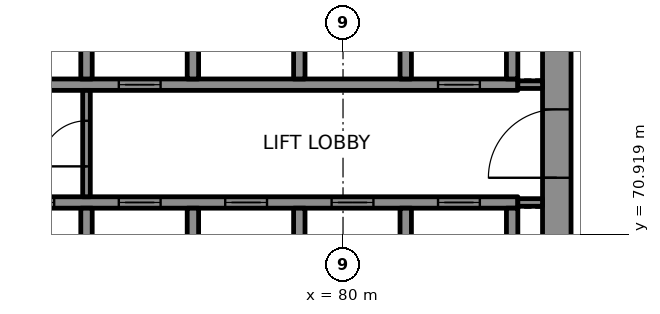
"""IFC4 building model, lengths in metres.
Left out: names, types, materials, properties, quantities, classifications, styles, units other than length and angle.
Written with IfcOpenShell. Run it as: python <this file> out.ifc"""

import sys

from ifc_helpers import new_model, si_unit, direction, frame, frame_2d, origin, place, context, subcontext, project, spatial, rectangle, extrude, element, fill, save


model = new_model("IFC4")
c1 = context("Model", 3, precision=1e-05, world=origin(), true_north=direction((0.0, 1.0)))
c2 = subcontext(c1, "Body", "Model", "MODEL_VIEW")
j1 = project(units=[si_unit("LENGTHUNIT", "METRE"), si_unit("PLANEANGLEUNIT", "RADIAN")], contexts=[c1])
p1 = place(None, origin())
s1 = spatial("IfcSite", under=j1, at=p1, CompositionType="ELEMENT")
p2 = place(p1, origin())
s2 = spatial("IfcBuilding", under=s1, at=p2, CompositionType="ELEMENT")
p3 = place(p2, frame((0.0, 0.0, 229.9)))
s3 = spatial("IfcBuildingStorey", under=s2, at=p3, CompositionType="ELEMENT", Elevation=229.9)
p4 = place(p3, frame((85.625, 67.75, 0.0), z_axis=(0.0, 0.0, 1.0), x_axis=(0.0, 1.0, 0.0)))
e1 = element("IfcWall", 1, at=p4, inside=s3, PredefinedType="SHEAR", context=c2, shape_type="SweptSolid", body=[
    extrude(rectangle(XDim=14.5, YDim=0.75, at=frame_2d((7.25, 0.0))), origin(), (0.0, 0.0, 1.0), 3.7),
])
p5 = place(p4, frame((4.65, 0.0, 0.0)))
e2 = element("IfcOpeningElement", 2, at=p5, cuts=e1, PredefinedType="OPENING", context=c2, shape_type="SweptSolid", body=[
    extrude(rectangle(XDim=1.8, YDim=2.1, at=frame_2d((0.9, 1.05))), frame((0.0, 0.385, 0.0), z_axis=(0.0, -1.0, 0.0), x_axis=(1.0, 0.0, 0.0)), (0.0, 0.0, 1.0), 0.77),
])
p6 = place(p4, frame((11.8, 0.0, 0.0)))
e3 = element("IfcOpeningElement", 3, at=p6, cuts=e1, PredefinedType="OPENING", context=c2, shape_type="SweptSolid", body=[
    extrude(rectangle(XDim=0.9, YDim=2.1, at=frame_2d((0.45, 1.05))), frame((0.0, 0.385, 0.0), z_axis=(0.0, -1.0, 0.0), x_axis=(1.0, 0.0, 0.0)), (0.0, 0.0, 1.0), 0.77),
])
p7 = place(p3, frame((70.3, 71.75, 0.0), z_axis=(0.0, 0.0, 1.0), x_axis=(1.0, 0.0, 0.0)))
e4 = element("IfcWall", 4, at=p7, inside=s3, PredefinedType="SHEAR", context=c2, shape_type="SweptSolid", body=[
    extrude(rectangle(XDim=14.3, YDim=0.3, at=frame_2d((7.15, 0.0))), origin(), (0.0, 0.0, 1.0), 3.7),
])
p8 = place(p7, frame((1.0, 0.0, 0.0)))
e5 = element("IfcOpeningElement", 5, at=p8, cuts=e4, PredefinedType="OPENING", context=c2, shape_type="SweptSolid", body=[
    extrude(rectangle(XDim=1.1, YDim=2.1, at=frame_2d((0.55, 1.05))), frame((0.0, 0.16, 0.0), z_axis=(0.0, -1.0, 0.0), x_axis=(1.0, 0.0, 0.0)), (0.0, 0.0, 1.0), 0.32),
])
p9 = place(p7, frame((3.8, 0.0, 0.0)))
e6 = element("IfcOpeningElement", 6, at=p9, cuts=e4, PredefinedType="OPENING", context=c2, shape_type="SweptSolid", body=[
    extrude(rectangle(XDim=1.1, YDim=2.1, at=frame_2d((0.55, 1.05))), frame((0.0, 0.16, 0.0), z_axis=(0.0, -1.0, 0.0), x_axis=(1.0, 0.0, 0.0)), (0.0, 0.0, 1.0), 0.32),
])
p10 = place(p7, frame((6.6, 0.0, 0.0)))
e7 = element("IfcOpeningElement", 7, at=p10, cuts=e4, PredefinedType="OPENING", context=c2, shape_type="SweptSolid", body=[
    extrude(rectangle(XDim=1.1, YDim=2.1, at=frame_2d((0.55, 1.05))), frame((0.0, 0.16, 0.0), z_axis=(0.0, -1.0, 0.0), x_axis=(1.0, 0.0, 0.0)), (0.0, 0.0, 1.0), 0.32),
])
p11 = place(p7, frame((9.4, 0.0, 0.0)))
e8 = element("IfcOpeningElement", 8, at=p11, cuts=e4, PredefinedType="OPENING", context=c2, shape_type="SweptSolid", body=[
    extrude(rectangle(XDim=1.1, YDim=2.1, at=frame_2d((0.55, 1.05))), frame((0.0, 0.16, 0.0), z_axis=(0.0, -1.0, 0.0), x_axis=(1.0, 0.0, 0.0)), (0.0, 0.0, 1.0), 0.32),
])
p12 = place(p7, frame((12.2, 0.0, 0.0)))
e9 = element("IfcOpeningElement", 9, at=p12, cuts=e4, PredefinedType="OPENING", context=c2, shape_type="SweptSolid", body=[
    extrude(rectangle(XDim=1.1, YDim=2.1, at=frame_2d((0.55, 1.05))), frame((0.0, 0.16, 0.0), z_axis=(0.0, -1.0, 0.0), x_axis=(1.0, 0.0, 0.0)), (0.0, 0.0, 1.0), 0.32),
])
p13 = place(p3, frame((70.3, 74.85, 0.0), z_axis=(0.0, 0.0, 1.0), x_axis=(1.0, 0.0, 0.0)))
e10 = element("IfcWall", 10, at=p13, inside=s3, PredefinedType="SHEAR", context=c2, shape_type="SweptSolid", body=[
    extrude(rectangle(XDim=14.3, YDim=0.3, at=frame_2d((7.15, 0.0))), origin(), (0.0, 0.0, 1.0), 3.7),
])
p14 = place(p13, frame((3.8, 0.0, 0.0)))
e11 = element("IfcOpeningElement", 11, at=p14, cuts=e10, PredefinedType="OPENING", context=c2, shape_type="SweptSolid", body=[
    extrude(rectangle(XDim=1.1, YDim=2.1, at=frame_2d((0.55, 1.05))), frame((0.0, 0.16, 0.0), z_axis=(0.0, -1.0, 0.0), x_axis=(1.0, 0.0, 0.0)), (0.0, 0.0, 1.0), 0.32),
])
p15 = place(p13, frame((12.2, 0.0, 0.0)))
e12 = element("IfcOpeningElement", 12, at=p15, cuts=e10, PredefinedType="OPENING", context=c2, shape_type="SweptSolid", body=[
    extrude(rectangle(XDim=1.1, YDim=2.1, at=frame_2d((0.55, 1.05))), frame((0.0, 0.16, 0.0), z_axis=(0.0, -1.0, 0.0), x_axis=(1.0, 0.0, 0.0)), (0.0, 0.0, 1.0), 0.32),
])
for number, where, z_axis, x_axis in (
    (13, (73.25, 69.0, 0.0), (0.0, 0.0, 1.0), (0.0, 1.0, 0.0)),
    (14, (73.25, 75.0, 0.0), (0.0, 0.0, 1.0), (0.0, 1.0, 0.0)),
    (15, (76.05, 69.0, 0.0), (0.0, 0.0, 1.0), (0.0, 1.0, 0.0)),
    (16, (76.05, 75.0, 0.0), (0.0, 0.0, 1.0), (0.0, 1.0, 0.0)),
    (17, (78.85, 69.0, 0.0), (0.0, 0.0, 1.0), (0.0, 1.0, 0.0)),
    (18, (78.85, 75.0, 0.0), (0.0, 0.0, 1.0), (0.0, 1.0, 0.0)),
    (19, (81.65, 69.0, 0.0), (0.0, 0.0, 1.0), (0.0, 1.0, 0.0)),
    (20, (81.65, 75.0, 0.0), (0.0, 0.0, 1.0), (0.0, 1.0, 0.0)),
    (21, (84.45, 69.0, 0.0), (0.0, 0.0, 1.0), (0.0, 1.0, 0.0)),
    (22, (84.45, 75.0, 0.0), (0.0, 0.0, 1.0), (0.0, 1.0, 0.0)),
):
    element("IfcWall", number, at=place(p3, frame(where, z_axis=z_axis, x_axis=x_axis)), inside=s3, PredefinedType="SHEAR", context=c2, shape_type="SweptSolid", body=[
        extrude(rectangle(XDim=2.6, YDim=0.3, at=frame_2d((1.3, 0.0))), origin(), (0.0, 0.0, 1.0), 3.7),
    ])
for number, where, z_axis, x_axis in (
    (23, (84.6, 71.75, 0.0), (0.0, 0.0, 1.0), (1.0, 0.0, 0.0)),
    (24, (84.6, 74.85, 0.0), (0.0, 0.0, 1.0), (1.0, 0.0, 0.0)),
):
    element("IfcWall", number, at=place(p3, frame(where, z_axis=z_axis, x_axis=x_axis)), inside=s3, PredefinedType="PARTITIONING", context=c2, shape_type="SweptSolid", body=[
        extrude(rectangle(XDim=0.65, YDim=0.2, at=frame_2d((0.325, 0.0))), origin(), (0.0, 0.0, 1.0), 3.7),
    ])
p16 = place(p3, frame((73.25, 71.9, 0.0), z_axis=(0.0, 0.0, 1.0), x_axis=(0.0, 1.0, 0.0)))
e25 = element("IfcWall", 25, at=p16, inside=s3, PredefinedType="PARTITIONING", context=c2, shape_type="SweptSolid", body=[
    extrude(rectangle(XDim=2.8, YDim=0.2, at=frame_2d((1.4, 0.0))), origin(), (0.0, 0.0, 1.0), 3.7),
])
p17 = place(p16, frame((0.8, 0.0, 0.0)))
e26 = element("IfcOpeningElement", 26, at=p17, cuts=e25, PredefinedType="OPENING", context=c2, shape_type="SweptSolid", body=[
    extrude(rectangle(XDim=1.2, YDim=2.1, at=frame_2d((0.6, 1.05))), frame((0.0, 0.11, 0.0), z_axis=(0.0, -1.0, 0.0), x_axis=(1.0, 0.0, 0.0)), (0.0, 0.0, 1.0), 0.22),
])
p18 = place(p8, origin())
e27 = element("IfcDoor", 27, at=p18, inside=s3, OperationType="DOUBLE_DOOR_SLIDING", PredefinedType="DOOR", context=c2, shape_type="SweptSolid", body=[
    extrude(rectangle(XDim=1.1, YDim=2.1, at=frame_2d((0.55, 1.05))), frame((0.0, 0.025, 0.0), z_axis=(0.0, -1.0, 0.0), x_axis=(1.0, 0.0, 0.0)), (0.0, 0.0, 1.0), 0.05),
])
fill(e5, e27)
p19 = place(p9, origin())
e28 = element("IfcDoor", 28, at=p19, inside=s3, OperationType="DOUBLE_DOOR_SLIDING", PredefinedType="DOOR", context=c2, shape_type="SweptSolid", body=[
    extrude(rectangle(XDim=1.1, YDim=2.1, at=frame_2d((0.55, 1.05))), frame((0.0, 0.025, 0.0), z_axis=(0.0, -1.0, 0.0), x_axis=(1.0, 0.0, 0.0)), (0.0, 0.0, 1.0), 0.05),
])
fill(e6, e28)
p20 = place(p10, origin())
e29 = element("IfcDoor", 29, at=p20, inside=s3, OperationType="DOUBLE_DOOR_SLIDING", PredefinedType="DOOR", context=c2, shape_type="SweptSolid", body=[
    extrude(rectangle(XDim=1.1, YDim=2.1, at=frame_2d((0.55, 1.05))), frame((0.0, 0.025, 0.0), z_axis=(0.0, -1.0, 0.0), x_axis=(1.0, 0.0, 0.0)), (0.0, 0.0, 1.0), 0.05),
])
fill(e7, e29)
p21 = place(p11, origin())
e30 = element("IfcDoor", 30, at=p21, inside=s3, OperationType="DOUBLE_DOOR_SLIDING", PredefinedType="DOOR", context=c2, shape_type="SweptSolid", body=[
    extrude(rectangle(XDim=1.1, YDim=2.1, at=frame_2d((0.55, 1.05))), frame((0.0, 0.025, 0.0), z_axis=(0.0, -1.0, 0.0), x_axis=(1.0, 0.0, 0.0)), (0.0, 0.0, 1.0), 0.05),
])
fill(e8, e30)
p22 = place(p12, origin())
e31 = element("IfcDoor", 31, at=p22, inside=s3, OperationType="DOUBLE_DOOR_SLIDING", PredefinedType="DOOR", context=c2, shape_type="SweptSolid", body=[
    extrude(rectangle(XDim=1.1, YDim=2.1, at=frame_2d((0.55, 1.05))), frame((0.0, 0.025, 0.0), z_axis=(0.0, -1.0, 0.0), x_axis=(1.0, 0.0, 0.0)), (0.0, 0.0, 1.0), 0.05),
])
fill(e9, e31)
p23 = place(p14, origin())
e32 = element("IfcDoor", 32, at=p23, inside=s3, OperationType="DOUBLE_DOOR_SLIDING", PredefinedType="DOOR", context=c2, shape_type="SweptSolid", body=[
    extrude(rectangle(XDim=1.1, YDim=2.1, at=frame_2d((0.55, 1.05))), frame((0.0, 0.025, 0.0), z_axis=(0.0, -1.0, 0.0), x_axis=(1.0, 0.0, 0.0)), (0.0, 0.0, 1.0), 0.05),
])
fill(e11, e32)
p24 = place(p15, origin())
e33 = element("IfcDoor", 33, at=p24, inside=s3, OperationType="DOUBLE_DOOR_SLIDING", PredefinedType="DOOR", context=c2, shape_type="SweptSolid", body=[
    extrude(rectangle(XDim=1.1, YDim=2.1, at=frame_2d((0.55, 1.05))), frame((0.0, 0.025, 0.0), z_axis=(0.0, -1.0, 0.0), x_axis=(1.0, 0.0, 0.0)), (0.0, 0.0, 1.0), 0.05),
])
fill(e12, e33)
p25 = place(p17, origin())
e34 = element("IfcDoor", 34, at=p25, inside=s3, OperationType="SINGLE_SWING_LEFT", PredefinedType="DOOR", context=c2, shape_type="SweptSolid", body=[
    extrude(rectangle(XDim=1.2, YDim=2.1, at=frame_2d((0.6, 1.05))), frame((0.0, 0.025, 0.0), z_axis=(0.0, -1.0, 0.0), x_axis=(1.0, 0.0, 0.0)), (0.0, 0.0, 1.0), 0.05),
])
fill(e26, e34)
p26 = place(p5, origin())
e35 = element("IfcDoor", 35, at=p26, inside=s3, OperationType="SINGLE_SWING_RIGHT", PredefinedType="DOOR", context=c2, shape_type="SweptSolid", body=[
    extrude(rectangle(XDim=1.8, YDim=2.1, at=frame_2d((0.9, 1.05))), frame((0.0, 0.095, 0.0), z_axis=(0.0, -1.0, 0.0), x_axis=(1.0, 0.0, 0.0)), (0.0, 0.0, 1.0), 0.19),
])
fill(e2, e35)
save(model, sys.argv[1])
